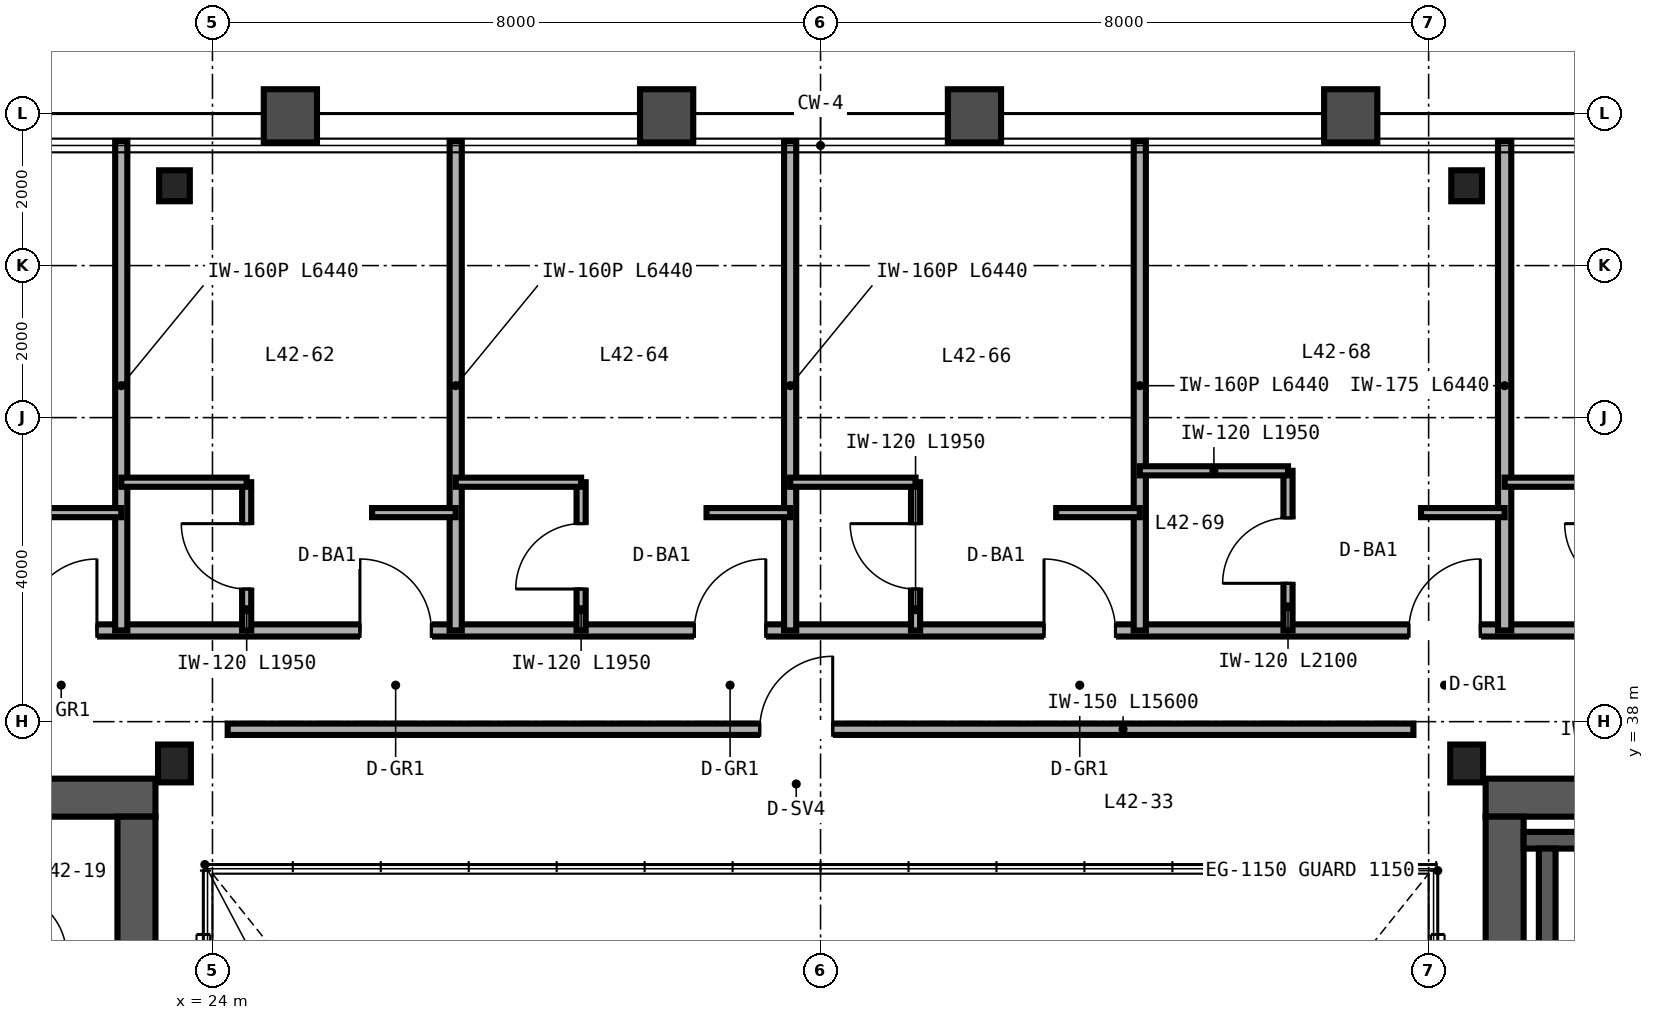
"""IFC4 building model, lengths in metres.
Left out: names, types, materials, properties, quantities, classifications, styles, units other than length and angle.
Written with IfcOpenShell. Run it as: python <this file> out.ifc"""

import sys

from ifc_helpers import new_model, si_unit, direction, frame, frame_2d, origin, origin_2d, place, context, subcontext, project, spatial, rectangle, i_section, extrude, source, transform, mapped, element, fill, save


model = new_model("IFC4")
c1 = context("Model", 3, precision=1e-05, world=origin(), true_north=direction((0.0, 1.0)))
c2 = subcontext(c1, "Body", "Model", "MODEL_VIEW")
j1 = project(units=[si_unit("LENGTHUNIT", "METRE"), si_unit("PLANEANGLEUNIT", "RADIAN")], contexts=[c1])
p1 = place(None, origin())
s1 = spatial("IfcSite", under=j1, at=p1, CompositionType="ELEMENT")
p2 = place(p1, origin())
s2 = spatial("IfcBuilding", under=s1, at=p2, CompositionType="ELEMENT")
p3 = place(p2, frame((0.0, 0.0, 170.4)))
s3 = spatial("IfcBuildingStorey", under=s2, at=p3, CompositionType="ELEMENT", Elevation=170.4)
p4 = place(p3, frame((10.75, 37.0, 0.0), z_axis=(0.0, 0.0, 1.0), x_axis=(1.0, 0.0, 0.0)))
e1 = element("IfcWall", 1, at=p4, inside=s3, PredefinedType="SHEAR", context=c2, shape_type="SweptSolid", body=[
    extrude(rectangle(XDim=12.5, YDim=0.5, at=frame_2d((6.25, 0.0))), origin(), (0.0, 0.0, 1.0), 3.37),
])
p5 = place(p4, frame((8.83, 0.0, 0.0)))
e2 = element("IfcOpeningElement", 2, at=p5, cuts=e1, PredefinedType="OPENING", context=c2, shape_type="SweptSolid", body=[
    extrude(rectangle(XDim=1.0, YDim=2.15, at=frame_2d((0.5, 1.075))), frame((0.0, 0.26, 0.0), z_axis=(0.0, -1.0, 0.0), x_axis=(1.0, 0.0, 0.0)), (0.0, 0.0, 1.0), 0.52),
])
p6 = place(p3, frame((23.0, 15.25, 0.0), z_axis=(0.0, 0.0, 1.0), x_axis=(0.0, 1.0, 0.0)))
e3 = element("IfcWall", 3, at=p6, inside=s3, PredefinedType="SHEAR", context=c2, shape_type="SweptSolid", body=[
    extrude(rectangle(XDim=21.5, YDim=0.5, at=frame_2d((10.75, 0.0))), origin(), (0.0, 0.0, 1.0), 3.37),
])
p7 = place(p3, frame((40.75, 37.0, 0.0), z_axis=(0.0, 0.0, 1.0), x_axis=(1.0, 0.0, 0.0)))
e4 = element("IfcWall", 4, at=p7, inside=s3, PredefinedType="SHEAR", context=c2, shape_type="SweptSolid", body=[
    extrude(rectangle(XDim=12.5, YDim=0.5, at=frame_2d((6.25, 0.0))), origin(), (0.0, 0.0, 1.0), 3.37),
])
p8 = place(p7, frame((9.95, 0.0, 0.0)))
e5 = element("IfcOpeningElement", 5, at=p8, cuts=e4, PredefinedType="OPENING", context=c2, shape_type="SweptSolid", body=[
    extrude(rectangle(XDim=1.1, YDim=2.15, at=frame_2d((0.55, 1.075))), frame((0.0, 0.26, 0.0), z_axis=(0.0, -1.0, 0.0), x_axis=(1.0, 0.0, 0.0)), (0.0, 0.0, 1.0), 0.52),
])
p9 = place(p3, frame((41.0, 15.25, 0.0), z_axis=(0.0, 0.0, 1.0), x_axis=(0.0, 1.0, 0.0)))
e6 = element("IfcWall", 6, at=p9, inside=s3, PredefinedType="SHEAR", context=c2, shape_type="SweptSolid", body=[
    extrude(rectangle(XDim=21.5, YDim=0.5, at=frame_2d((10.75, 0.0))), origin(), (0.0, 0.0, 1.0), 3.37),
])
p10 = place(p3, frame((41.25, 36.44, 0.0), z_axis=(0.0, 0.0, 1.0), x_axis=(1.0, 0.0, 0.0)))
e7 = element("IfcWall", 7, at=p10, inside=s3, PredefinedType="SHEAR", context=c2, shape_type="SweptSolid", body=[
    extrude(rectangle(XDim=8.06, YDim=0.22, at=frame_2d((4.03, 0.0))), origin(), (0.0, 0.0, 1.0), 3.4),
])
p11 = place(p3, frame((41.56, 33.05, 0.0), z_axis=(0.0, 0.0, 1.0), x_axis=(0.0, 1.0, 0.0)))
e8 = element("IfcWall", 8, at=p11, inside=s3, PredefinedType="SHEAR", context=c2, shape_type="SweptSolid", body=[
    extrude(rectangle(XDim=3.28, YDim=0.22, at=frame_2d((1.64, 0.0))), origin(), (0.0, 0.0, 1.0), 3.4),
])
m1 = source(origin(), c2, "Body", "SweptSolid", [
    extrude(i_section(OverallWidth=0.432, OverallDepth=0.498, WebThickness=0.056, FlangeThickness=0.089, FilletRadius=0.025, at=origin_2d()), origin(), (0.0, 0.0, 1.0), 3.37),
])
for number, where, z_axis, x_axis in (
    (9, (23.5, 37.45, 0.0), (0.0, 0.0, 1.0), (1.0, 0.0, 0.0)),
    (10, (40.5, 37.45, 0.0), (0.0, 0.0, 1.0), (1.0, 0.0, 0.0)),
):
    element("IfcColumn", number, at=place(p3, frame(where, z_axis=z_axis, x_axis=x_axis)), inside=s3, PredefinedType="COLUMN", context=c2, shape_type="MappedRepresentation", body=[
        mapped(m1, transform((0.0, 0.0, 0.0), scale=1.0)),
    ])
m2 = source(origin(), c2, "Body", "SweptSolid", [
    extrude(i_section(OverallWidth=0.404, OverallDepth=0.407, WebThickness=0.027, FlangeThickness=0.044, FilletRadius=0.025, at=origin_2d()), origin(), (0.0, 0.0, 1.0), 3.37),
])
for number, where, z_axis, x_axis in (
    (11, (23.5, 45.05, 0.0), (0.0, 0.0, 1.0), (1.0, 0.0, 0.0)),
    (12, (40.5, 45.05, 0.0), (0.0, 0.0, 1.0), (1.0, 0.0, 0.0)),
):
    element("IfcColumn", number, at=place(p3, frame(where, z_axis=z_axis, x_axis=x_axis)), inside=s3, PredefinedType="COLUMN", context=c2, shape_type="MappedRepresentation", body=[
        mapped(m2, transform((0.0, 0.0, 0.0), scale=1.0)),
    ])
p12 = place(p3, frame((24.2, 37.9, 0.0), z_axis=(0.0, 0.0, 1.0), x_axis=(1.0, 0.0, 0.0)))
e13 = element("IfcWall", 13, at=p12, inside=s3, PredefinedType="PARTITIONING", context=c2, shape_type="SweptSolid", body=[
    extrude(rectangle(XDim=15.6, YDim=0.15, at=frame_2d((7.8, 0.0))), origin(), (0.0, 0.0, 1.0), 3.37),
])
p13 = place(p12, frame((7.0, 0.0, 0.0)))
e14 = element("IfcOpeningElement", 14, at=p13, cuts=e13, PredefinedType="OPENING", context=c2, shape_type="SweptSolid", body=[
    extrude(rectangle(XDim=0.96, YDim=2.15, at=frame_2d((0.48, 1.075))), frame((0.0, 0.085, 0.0), z_axis=(0.0, -1.0, 0.0), x_axis=(1.0, 0.0, 0.0)), (0.0, 0.0, 1.0), 0.17),
])
p14 = place(p3, frame((14.0, 39.2, 0.0), z_axis=(0.0, 0.0, 1.0), x_axis=(1.0, 0.0, 0.0)))
e15 = element("IfcWall", 15, at=p14, inside=s3, PredefinedType="PARTITIONING", context=c2, shape_type="SweptSolid", body=[
    extrude(rectangle(XDim=36.0, YDim=0.16, at=frame_2d((18.0, 0.0))), origin(), (0.0, 0.0, 1.0), 2.913),
])
p15 = place(p14, frame((3.14, 0.0, 0.0)))
e16 = element("IfcOpeningElement", 16, at=p15, cuts=e15, PredefinedType="OPENING", context=c2, shape_type="SweptSolid", body=[
    extrude(rectangle(XDim=0.94, YDim=2.15, at=frame_2d((0.47, 1.075))), frame((0.0, 0.09, 0.0), z_axis=(0.0, -1.0, 0.0), x_axis=(1.0, 0.0, 0.0)), (0.0, 0.0, 1.0), 0.18),
])
p16 = place(p14, frame((7.54, 0.0, 0.0)))
e17 = element("IfcOpeningElement", 17, at=p16, cuts=e15, PredefinedType="OPENING", context=c2, shape_type="SweptSolid", body=[
    extrude(rectangle(XDim=0.94, YDim=2.15, at=frame_2d((0.47, 1.075))), frame((0.0, 0.09, 0.0), z_axis=(0.0, -1.0, 0.0), x_axis=(1.0, 0.0, 0.0)), (0.0, 0.0, 1.0), 0.18),
])
p17 = place(p14, frame((11.94, 0.0, 0.0)))
e18 = element("IfcOpeningElement", 18, at=p17, cuts=e15, PredefinedType="OPENING", context=c2, shape_type="SweptSolid", body=[
    extrude(rectangle(XDim=0.94, YDim=2.15, at=frame_2d((0.47, 1.075))), frame((0.0, 0.09, 0.0), z_axis=(0.0, -1.0, 0.0), x_axis=(1.0, 0.0, 0.0)), (0.0, 0.0, 1.0), 0.18),
])
p18 = place(p14, frame((16.34, 0.0, 0.0)))
e19 = element("IfcOpeningElement", 19, at=p18, cuts=e15, PredefinedType="OPENING", context=c2, shape_type="SweptSolid", body=[
    extrude(rectangle(XDim=0.94, YDim=2.15, at=frame_2d((0.47, 1.075))), frame((0.0, 0.09, 0.0), z_axis=(0.0, -1.0, 0.0), x_axis=(1.0, 0.0, 0.0)), (0.0, 0.0, 1.0), 0.18),
])
p19 = place(p14, frame((20.94, 0.0, 0.0)))
e20 = element("IfcOpeningElement", 20, at=p19, cuts=e15, PredefinedType="OPENING", context=c2, shape_type="SweptSolid", body=[
    extrude(rectangle(XDim=0.94, YDim=2.15, at=frame_2d((0.47, 1.075))), frame((0.0, 0.09, 0.0), z_axis=(0.0, -1.0, 0.0), x_axis=(1.0, 0.0, 0.0)), (0.0, 0.0, 1.0), 0.18),
])
p20 = place(p14, frame((25.74, 0.0, 0.0)))
e21 = element("IfcOpeningElement", 21, at=p20, cuts=e15, PredefinedType="OPENING", context=c2, shape_type="SweptSolid", body=[
    extrude(rectangle(XDim=0.94, YDim=2.15, at=frame_2d((0.47, 1.075))), frame((0.0, 0.09, 0.0), z_axis=(0.0, -1.0, 0.0), x_axis=(1.0, 0.0, 0.0)), (0.0, 0.0, 1.0), 0.18),
])
p21 = place(p14, frame((30.24, 0.0, 0.0)))
e22 = element("IfcOpeningElement", 22, at=p21, cuts=e15, PredefinedType="OPENING", context=c2, shape_type="SweptSolid", body=[
    extrude(rectangle(XDim=0.94, YDim=2.15, at=frame_2d((0.47, 1.075))), frame((0.0, 0.09, 0.0), z_axis=(0.0, -1.0, 0.0), x_axis=(1.0, 0.0, 0.0)), (0.0, 0.0, 1.0), 0.18),
])
p22 = place(p14, frame((34.74, 0.0, 0.0)))
e23 = element("IfcOpeningElement", 23, at=p22, cuts=e15, PredefinedType="OPENING", context=c2, shape_type="SweptSolid", body=[
    extrude(rectangle(XDim=0.94, YDim=2.15, at=frame_2d((0.47, 1.075))), frame((0.0, 0.09, 0.0), z_axis=(0.0, -1.0, 0.0), x_axis=(1.0, 0.0, 0.0)), (0.0, 0.0, 1.0), 0.18),
])
p23 = place(p3, frame((22.8, 39.2, 0.0), z_axis=(0.0, 0.0, 1.0), x_axis=(0.0, 1.0, 0.0)))
e24 = element("IfcWall", 24, at=p23, inside=s3, PredefinedType="PARTITIONING", context=c2, shape_type="SweptSolid", body=[
    extrude(rectangle(XDim=6.44, YDim=0.16, at=frame_2d((3.22, 0.0))), origin(), (0.0, 0.0, 1.0), 2.833),
])
p24 = place(p3, frame((21.7, 40.75, 0.0), z_axis=(0.0, 0.0, 1.0), x_axis=(1.0, 0.0, 0.0)))
e25 = element("IfcWall", 25, at=p24, inside=s3, PredefinedType="PARTITIONING", context=c2, shape_type="SweptSolid", body=[
    extrude(rectangle(XDim=1.1, YDim=0.12, at=frame_2d((0.55, 0.0))), origin(), (0.0, 0.0, 1.0), 3.37),
])
p25 = place(p3, frame((27.2, 39.2, 0.0), z_axis=(0.0, 0.0, 1.0), x_axis=(0.0, 1.0, 0.0)))
e26 = element("IfcWall", 26, at=p25, inside=s3, PredefinedType="PARTITIONING", context=c2, shape_type="SweptSolid", body=[
    extrude(rectangle(XDim=6.44, YDim=0.16, at=frame_2d((3.22, 0.0))), origin(), (0.0, 0.0, 1.0), 2.443),
])
p26 = place(p3, frame((24.45, 39.2, 0.0), z_axis=(0.0, 0.0, 1.0), x_axis=(0.0, 1.0, 0.0)))
e27 = element("IfcWall", 27, at=p26, inside=s3, PredefinedType="PARTITIONING", context=c2, shape_type="SweptSolid", body=[
    extrude(rectangle(XDim=1.95, YDim=0.12, at=frame_2d((0.975, 0.0))), origin(), (0.0, 0.0, 1.0), 3.37),
])
p27 = place(p26, frame((0.545, 0.0, 0.0)))
e28 = element("IfcOpeningElement", 28, at=p27, cuts=e27, PredefinedType="OPENING", context=c2, shape_type="SweptSolid", body=[
    extrude(rectangle(XDim=0.86, YDim=2.1, at=frame_2d((0.43, 1.05))), frame((0.0, 0.07, 0.0), z_axis=(0.0, -1.0, 0.0), x_axis=(1.0, 0.0, 0.0)), (0.0, 0.0, 1.0), 0.14),
])
p28 = place(p3, frame((22.8, 41.15, 0.0), z_axis=(0.0, 0.0, 1.0), x_axis=(1.0, 0.0, 0.0)))
e29 = element("IfcWall", 29, at=p28, inside=s3, PredefinedType="PARTITIONING", context=c2, shape_type="SweptSolid", body=[
    extrude(rectangle(XDim=1.65, YDim=0.12, at=frame_2d((0.825, 0.0))), origin(), (0.0, 0.0, 1.0), 2.913),
])
p29 = place(p3, frame((26.1, 40.75, 0.0), z_axis=(0.0, 0.0, 1.0), x_axis=(1.0, 0.0, 0.0)))
e30 = element("IfcWall", 30, at=p29, inside=s3, PredefinedType="PARTITIONING", context=c2, shape_type="SweptSolid", body=[
    extrude(rectangle(XDim=1.1, YDim=0.12, at=frame_2d((0.55, 0.0))), origin(), (0.0, 0.0, 1.0), 3.37),
])
p30 = place(p3, frame((31.6, 39.2, 0.0), z_axis=(0.0, 0.0, 1.0), x_axis=(0.0, 1.0, 0.0)))
e31 = element("IfcWall", 31, at=p30, inside=s3, PredefinedType="PARTITIONING", context=c2, shape_type="SweptSolid", body=[
    extrude(rectangle(XDim=6.44, YDim=0.16, at=frame_2d((3.22, 0.0))), origin(), (0.0, 0.0, 1.0), 2.443),
])
p31 = place(p3, frame((28.85, 39.2, 0.0), z_axis=(0.0, 0.0, 1.0), x_axis=(0.0, 1.0, 0.0)))
e32 = element("IfcWall", 32, at=p31, inside=s3, PredefinedType="PARTITIONING", context=c2, shape_type="SweptSolid", body=[
    extrude(rectangle(XDim=1.95, YDim=0.12, at=frame_2d((0.975, 0.0))), origin(), (0.0, 0.0, 1.0), 3.37),
])
p32 = place(p31, frame((0.545, 0.0, 0.0)))
e33 = element("IfcOpeningElement", 33, at=p32, cuts=e32, PredefinedType="OPENING", context=c2, shape_type="SweptSolid", body=[
    extrude(rectangle(XDim=0.86, YDim=2.1, at=frame_2d((0.43, 1.05))), frame((0.0, 0.07, 0.0), z_axis=(0.0, -1.0, 0.0), x_axis=(1.0, 0.0, 0.0)), (0.0, 0.0, 1.0), 0.14),
])
p33 = place(p3, frame((27.2, 41.15, 0.0), z_axis=(0.0, 0.0, 1.0), x_axis=(1.0, 0.0, 0.0)))
e34 = element("IfcWall", 34, at=p33, inside=s3, PredefinedType="PARTITIONING", context=c2, shape_type="SweptSolid", body=[
    extrude(rectangle(XDim=1.65, YDim=0.12, at=frame_2d((0.825, 0.0))), origin(), (0.0, 0.0, 1.0), 3.37),
])
p34 = place(p3, frame((30.5, 40.75, 0.0), z_axis=(0.0, 0.0, 1.0), x_axis=(1.0, 0.0, 0.0)))
e35 = element("IfcWall", 35, at=p34, inside=s3, PredefinedType="PARTITIONING", context=c2, shape_type="SweptSolid", body=[
    extrude(rectangle(XDim=1.1, YDim=0.12, at=frame_2d((0.55, 0.0))), origin(), (0.0, 0.0, 1.0), 3.37),
])
p35 = place(p3, frame((36.2, 39.2, 0.0), z_axis=(0.0, 0.0, 1.0), x_axis=(0.0, 1.0, 0.0)))
e36 = element("IfcWall", 36, at=p35, inside=s3, PredefinedType="PARTITIONING", context=c2, shape_type="SweptSolid", body=[
    extrude(rectangle(XDim=6.44, YDim=0.16, at=frame_2d((3.22, 0.0))), origin(), (0.0, 0.0, 1.0), 2.443),
])
p36 = place(p3, frame((33.25, 39.2, 0.0), z_axis=(0.0, 0.0, 1.0), x_axis=(0.0, 1.0, 0.0)))
e37 = element("IfcWall", 37, at=p36, inside=s3, PredefinedType="PARTITIONING", context=c2, shape_type="SweptSolid", body=[
    extrude(rectangle(XDim=1.95, YDim=0.12, at=frame_2d((0.975, 0.0))), origin(), (0.0, 0.0, 1.0), 3.37),
])
p37 = place(p36, frame((0.545, 0.0, 0.0)))
e38 = element("IfcOpeningElement", 38, at=p37, cuts=e37, PredefinedType="OPENING", context=c2, shape_type="SweptSolid", body=[
    extrude(rectangle(XDim=0.86, YDim=2.1, at=frame_2d((0.43, 1.05))), frame((0.0, 0.07, 0.0), z_axis=(0.0, -1.0, 0.0), x_axis=(1.0, 0.0, 0.0)), (0.0, 0.0, 1.0), 0.14),
])
p38 = place(p3, frame((31.6, 41.15, 0.0), z_axis=(0.0, 0.0, 1.0), x_axis=(1.0, 0.0, 0.0)))
e39 = element("IfcWall", 39, at=p38, inside=s3, PredefinedType="PARTITIONING", context=c2, shape_type="SweptSolid", body=[
    extrude(rectangle(XDim=1.65, YDim=0.12, at=frame_2d((0.825, 0.0))), origin(), (0.0, 0.0, 1.0), 3.37),
])
p39 = place(p3, frame((35.1, 40.75, 0.0), z_axis=(0.0, 0.0, 1.0), x_axis=(1.0, 0.0, 0.0)))
e40 = element("IfcWall", 40, at=p39, inside=s3, PredefinedType="PARTITIONING", context=c2, shape_type="SweptSolid", body=[
    extrude(rectangle(XDim=1.1, YDim=0.12, at=frame_2d((0.55, 0.0))), origin(), (0.0, 0.0, 1.0), 3.37),
])
p40 = place(p3, frame((41.0, 39.2, 0.0), z_axis=(0.0, 0.0, 1.0), x_axis=(0.0, 1.0, 0.0)))
e41 = element("IfcWall", 41, at=p40, inside=s3, PredefinedType="PARTITIONING", context=c2, shape_type="SweptSolid", body=[
    extrude(rectangle(XDim=6.44, YDim=0.175, at=frame_2d((3.22, 0.0))), origin(), (0.0, 0.0, 1.0), 2.833),
])
p41 = place(p3, frame((38.15, 39.2, 0.0), z_axis=(0.0, 0.0, 1.0), x_axis=(0.0, 1.0, 0.0)))
e42 = element("IfcWall", 42, at=p41, inside=s3, PredefinedType="PARTITIONING", context=c2, shape_type="SweptSolid", body=[
    extrude(rectangle(XDim=2.1, YDim=0.12, at=frame_2d((1.05, 0.0))), origin(), (0.0, 0.0, 1.0), 3.37),
])
p42 = place(p41, frame((0.62, 0.0, 0.0)))
e43 = element("IfcOpeningElement", 43, at=p42, cuts=e42, PredefinedType="OPENING", context=c2, shape_type="SweptSolid", body=[
    extrude(rectangle(XDim=0.86, YDim=2.1, at=frame_2d((0.43, 1.05))), frame((0.0, 0.07, 0.0), z_axis=(0.0, -1.0, 0.0), x_axis=(1.0, 0.0, 0.0)), (0.0, 0.0, 1.0), 0.14),
])
p43 = place(p3, frame((36.2, 41.3, 0.0), z_axis=(0.0, 0.0, 1.0), x_axis=(1.0, 0.0, 0.0)))
e44 = element("IfcWall", 44, at=p43, inside=s3, PredefinedType="PARTITIONING", context=c2, shape_type="SweptSolid", body=[
    extrude(rectangle(XDim=1.95, YDim=0.12, at=frame_2d((0.975, 0.0))), origin(), (0.0, 0.0, 1.0), 3.37),
])
p44 = place(p3, frame((39.9, 40.75, 0.0), z_axis=(0.0, 0.0, 1.0), x_axis=(1.0, 0.0, 0.0)))
e45 = element("IfcWall", 45, at=p44, inside=s3, PredefinedType="PARTITIONING", context=c2, shape_type="SweptSolid", body=[
    extrude(rectangle(XDim=1.1, YDim=0.12, at=frame_2d((0.55, 0.0))), origin(), (0.0, 0.0, 1.0), 2.913),
])
p45 = place(p3, frame((41.0, 41.15, 0.0), z_axis=(0.0, 0.0, 1.0), x_axis=(1.0, 0.0, 0.0)))
e46 = element("IfcWall", 46, at=p45, inside=s3, PredefinedType="PARTITIONING", context=c2, shape_type="SweptSolid", body=[
    extrude(rectangle(XDim=1.65, YDim=0.12, at=frame_2d((0.825, 0.0))), origin(), (0.0, 0.0, 1.0), 3.37),
])
m3 = source(origin(), c2, "Body", "SweptSolid", [
    extrude(rectangle(XDim=0.96, YDim=2.15, at=frame_2d((0.48, 1.075))), frame((0.0, 0.025, 0.0), z_axis=(0.0, -1.0, 0.0), x_axis=(1.0, 0.0, 0.0)), (0.0, 0.0, 1.0), 0.05),
])
p46 = place(p13, origin())
e47 = element("IfcDoor", 47, at=p46, inside=s3, OperationType="SINGLE_SWING_RIGHT", PredefinedType="DOOR", context=c2, shape_type="MappedRepresentation", body=[
    mapped(m3, transform((0.0, 0.0, 0.0), scale=1.0)),
])
fill(e14, e47)
m4 = source(origin(), c2, "Body", "SweptSolid", [
    extrude(rectangle(XDim=0.86, YDim=2.1, at=frame_2d((0.43, 1.05))), frame((0.0, 0.025, 0.0), z_axis=(0.0, -1.0, 0.0), x_axis=(1.0, 0.0, 0.0)), (0.0, 0.0, 1.0), 0.05),
])
p47 = place(p27, origin())
e48 = element("IfcDoor", 48, at=p47, inside=s3, OperationType="SINGLE_SWING_RIGHT", PredefinedType="DOOR", context=c2, shape_type="MappedRepresentation", body=[
    mapped(m4, transform((0.0, 0.0, 0.0), scale=1.0)),
])
fill(e28, e48)
p48 = place(p32, origin())
e49 = element("IfcDoor", 49, at=p48, inside=s3, OperationType="SINGLE_SWING_LEFT", PredefinedType="DOOR", context=c2, shape_type="MappedRepresentation", body=[
    mapped(m4, transform((0.0, 0.0, 0.0), scale=1.0)),
])
fill(e33, e49)
p49 = place(p37, origin())
e50 = element("IfcDoor", 50, at=p49, inside=s3, OperationType="SINGLE_SWING_RIGHT", PredefinedType="DOOR", context=c2, shape_type="MappedRepresentation", body=[
    mapped(m4, transform((0.0, 0.0, 0.0), scale=1.0)),
])
fill(e38, e50)
p50 = place(p42, origin())
e51 = element("IfcDoor", 51, at=p50, inside=s3, OperationType="SINGLE_SWING_LEFT", PredefinedType="DOOR", context=c2, shape_type="MappedRepresentation", body=[
    mapped(m4, transform((0.0, 0.0, 0.0), scale=1.0)),
])
fill(e43, e51)
m5 = source(origin(), c2, "Body", "SweptSolid", [
    extrude(rectangle(XDim=0.94, YDim=2.15, at=frame_2d((0.47, 1.075))), frame((0.0, 0.025, 0.0), z_axis=(0.0, -1.0, 0.0), x_axis=(1.0, 0.0, 0.0)), (0.0, 0.0, 1.0), 0.05),
])
p51 = place(p16, origin())
e52 = element("IfcDoor", 52, at=p51, inside=s3, OperationType="SINGLE_SWING_RIGHT", PredefinedType="DOOR", context=c2, shape_type="MappedRepresentation", body=[
    mapped(m5, transform((0.0, 0.0, 0.0), scale=1.0)),
])
fill(e17, e52)
p52 = place(p17, origin())
e53 = element("IfcDoor", 53, at=p52, inside=s3, OperationType="SINGLE_SWING_LEFT", PredefinedType="DOOR", context=c2, shape_type="MappedRepresentation", body=[
    mapped(m5, transform((0.0, 0.0, 0.0), scale=1.0)),
])
fill(e18, e53)
p53 = place(p18, origin())
e54 = element("IfcDoor", 54, at=p53, inside=s3, OperationType="SINGLE_SWING_RIGHT", PredefinedType="DOOR", context=c2, shape_type="MappedRepresentation", body=[
    mapped(m5, transform((0.0, 0.0, 0.0), scale=1.0)),
])
fill(e19, e54)
p54 = place(p19, origin())
e55 = element("IfcDoor", 55, at=p54, inside=s3, OperationType="SINGLE_SWING_LEFT", PredefinedType="DOOR", context=c2, shape_type="MappedRepresentation", body=[
    mapped(m5, transform((0.0, 0.0, 0.0), scale=1.0)),
])
fill(e20, e55)
p55 = place(p20, origin())
e56 = element("IfcDoor", 56, at=p55, inside=s3, OperationType="SINGLE_SWING_RIGHT", PredefinedType="DOOR", context=c2, shape_type="MappedRepresentation", body=[
    mapped(m5, transform((0.0, 0.0, 0.0), scale=1.0)),
])
fill(e21, e56)
save(model, sys.argv[1])
